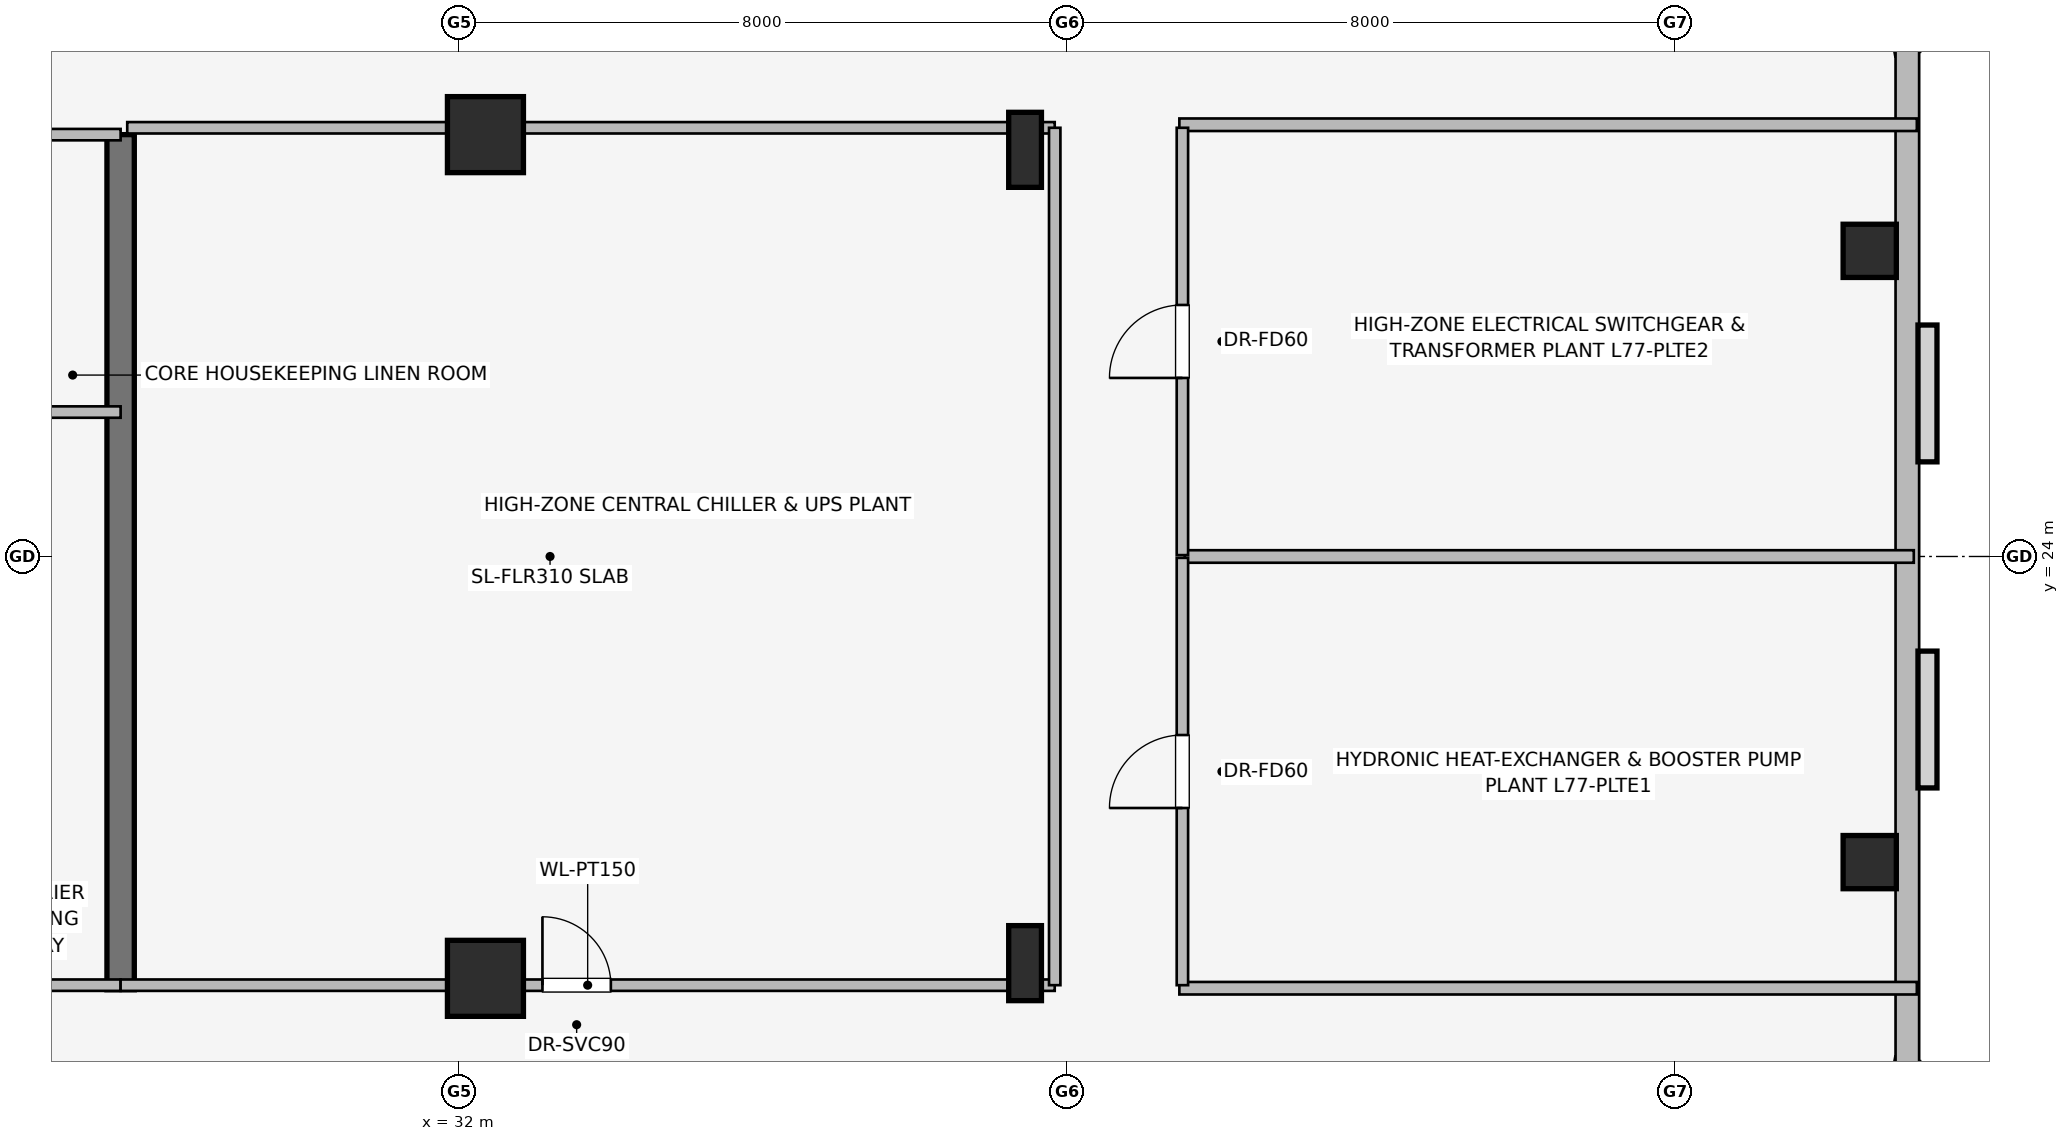
"""IFC4 building model, lengths in metres.
Left out: names, types, materials, properties, quantities, classifications, styles, units other than length and angle.
Written with IfcOpenShell. Run it as: python <this file> out.ifc"""

import sys

from ifc_helpers import new_model, si_unit, direction, frame, frame_2d, origin, origin_2d, place, context, subcontext, project, spatial, rectangle, i_section, extrude, element, fill, save


model = new_model("IFC4")
c1 = context("Model", 3, precision=1e-05, world=origin(), true_north=direction((0.0, 1.0)))
c2 = subcontext(c1, "Body", "Model", "MODEL_VIEW")
j1 = project(units=[si_unit("LENGTHUNIT", "METRE"), si_unit("PLANEANGLEUNIT", "RADIAN")], contexts=[c1])
p1 = place(None, origin())
s1 = spatial("IfcSite", under=j1, at=p1, CompositionType="ELEMENT")
p2 = place(p1, origin())
s2 = spatial("IfcBuilding", under=s1, at=p2, CompositionType="ELEMENT")
p3 = place(p2, frame((0.0, 0.0, 285.1)))
s3 = spatial("IfcBuildingStorey", under=s2, at=p3, CompositionType="ELEMENT", Elevation=285.1)
p4 = place(p3, frame((27.55, 29.55, 0.0), z_axis=(0.0, 0.0, 1.0), x_axis=(0.0, -1.0, 0.0)))
e1 = element("IfcWall", 1, at=p4, inside=s3, PredefinedType="SHEAR", context=c2, shape_type="SweptSolid", body=[
    extrude(rectangle(XDim=11.25, YDim=0.36, at=frame_2d((5.625, 0.0))), origin(), (0.0, 0.0, 1.0), 6.2),
])
for number, where, z_axis, x_axis in (
    (2, (32.35, 18.45, 0.0), (0.0, 0.0, 1.0), (1.0, 0.0, 0.0)),
    (3, (32.35, 29.55, 0.0), (0.0, 0.0, 1.0), (1.0, 0.0, 0.0)),
):
    element("IfcColumn", number, at=place(p3, frame(where, z_axis=z_axis, x_axis=x_axis)), inside=s3, PredefinedType="COLUMN", context=c2, shape_type="SweptSolid", body=[
        extrude(rectangle(XDim=1.0, YDim=1.0, at=origin_2d()), origin(), (0.0, 0.0, 1.0), 6.2),
    ])
for number, where, z_axis, x_axis in (
    (4, (50.563, 19.979, 0.0), (0.0, 0.0, 1.0), (1.0, 0.0, 0.0)),
    (5, (50.563, 28.021, 0.0), (0.0, 0.0, 1.0), (1.0, 0.0, 0.0)),
):
    element("IfcColumn", number, at=place(p3, frame(where, z_axis=z_axis, x_axis=x_axis)), inside=s3, PredefinedType="COLUMN", context=c2, shape_type="SweptSolid", body=[
        extrude(rectangle(XDim=0.7, YDim=0.7, at=origin_2d()), origin(), (0.0, 0.0, 1.0), 6.2),
    ])
for number, where, z_axis, x_axis in (
    (6, (39.45, 18.65, 0.0), (0.0, 0.0, 1.0), (1.0, 0.0, 0.0)),
    (7, (39.45, 29.35, 0.0), (0.0, 0.0, 1.0), (1.0, 0.0, 0.0)),
):
    element("IfcColumn", number, at=place(p3, frame(where, z_axis=z_axis, x_axis=x_axis)), inside=s3, PredefinedType="COLUMN", context=c2, shape_type="SweptSolid", body=[
        extrude(i_section(OverallWidth=0.431, OverallDepth=0.987, WebThickness=0.034, FlangeThickness=0.062, at=origin_2d()), origin(), (0.0, 0.0, 1.0), 6.2),
    ])
for number, where, z_axis, x_axis in (
    (8, (50.759, 32.257, 0.0), (0.0, 0.0, 1.0), (0.181, -0.984, 0.0)),
    (9, (51.062, 17.392, 0.0), (0.0, 0.0, 1.0), (-0.181, -0.984, 0.0)),
):
    element("IfcWall", number, at=place(p3, frame(where, z_axis=z_axis, x_axis=x_axis)), inside=s3, PredefinedType="STANDARD", context=c2, shape_type="SweptSolid", body=[
        extrude(rectangle(XDim=1.677, YDim=0.33, at=frame_2d((0.838, 0.0))), origin(), (0.0, 0.0, 1.0), 5.88),
    ])
p5 = place(p3, frame((51.058, 30.702, 0.0), z_axis=(0.0, 0.0, 1.0), x_axis=(0.0, -1.0, 0.0)))
e10 = element("IfcWall", 10, at=p5, inside=s3, PredefinedType="STANDARD", context=c2, shape_type="SweptSolid", body=[
    extrude(rectangle(XDim=13.404, YDim=0.31, at=frame_2d((6.702, 0.0))), origin(), (0.0, 0.0, 1.0), 5.88),
])
for number, where, z_axis, x_axis in (
    (11, (25.32, 25.9, 0.0), (0.0, 0.0, 1.0), (1.0, 0.0, 0.0)),
    (12, (25.32, 18.36, 0.0), (0.0, 0.0, 1.0), (1.0, 0.0, 0.0)),
):
    element("IfcWall", number, at=place(p3, frame(where, z_axis=z_axis, x_axis=x_axis)), inside=s3, PredefinedType="PARTITIONING", context=c2, shape_type="SweptSolid", body=[
        extrude(rectangle(XDim=2.23, YDim=0.15, at=frame_2d((1.115, 0.0))), origin(), (0.0, 0.0, 1.0), 5.88),
    ])
p6 = place(p3, frame((27.55, 29.55, 0.0), z_axis=(0.0, 0.0, 1.0), x_axis=(-1.0, 0.0, 0.0)))
e13 = element("IfcWall", 13, at=p6, inside=s3, PredefinedType="PARTITIONING", context=c2, shape_type="SweptSolid", body=[
    extrude(rectangle(XDim=2.23, YDim=0.15, at=frame_2d((1.115, 0.0))), origin(), (0.0, 0.0, 1.0), 4.78),
])
p7 = place(p3, frame((27.55, 18.36, 0.0), z_axis=(0.0, 0.0, 1.0), x_axis=(1.0, 0.0, 0.0)))
e14 = element("IfcWall", 14, at=p7, inside=s3, PredefinedType="PARTITIONING", context=c2, shape_type="SweptSolid", body=[
    extrude(rectangle(XDim=12.29, YDim=0.15, at=frame_2d((6.145, 0.0))), origin(), (0.0, 0.0, 1.0), 5.021),
])
p8 = place(p7, frame((5.55, 0.0, 0.0)))
e15 = element("IfcOpeningElement", 15, at=p8, cuts=e14, PredefinedType="OPENING", context=c2, shape_type="SweptSolid", body=[
    extrude(rectangle(XDim=0.9, YDim=2.0, at=frame_2d((0.45, 1.0))), frame((0.0, 0.085, 0.0), z_axis=(0.0, -1.0, 0.0), x_axis=(1.0, 0.0, 0.0)), (0.0, 0.0, 1.0), 0.17),
])
p9 = place(p3, frame((39.84, 29.64, 0.0), z_axis=(0.0, 0.0, 1.0), x_axis=(-1.0, 0.0, 0.0)))
e16 = element("IfcWall", 16, at=p9, inside=s3, PredefinedType="PARTITIONING", context=c2, shape_type="SweptSolid", body=[
    extrude(rectangle(XDim=12.203, YDim=0.15, at=frame_2d((6.102, 0.0))), origin(), (0.0, 0.0, 1.0), 5.021),
])
p10 = place(p3, frame((39.84, 18.36, 0.0), z_axis=(0.0, 0.0, 1.0), x_axis=(0.0, 1.0, 0.0)))
e17 = element("IfcWall", 17, at=p10, inside=s3, PredefinedType="PARTITIONING", context=c2, shape_type="SweptSolid", body=[
    extrude(rectangle(XDim=11.28, YDim=0.15, at=frame_2d((5.64, 0.0))), origin(), (0.0, 0.0, 1.0), 5.88),
])
for number, where, z_axis, x_axis in (
    (18, (41.48, 18.32, 0.0), (0.0, 0.0, 1.0), (1.0, 0.0, 0.0)),
    (19, (41.48, 29.68, 0.0), (0.0, 0.0, 1.0), (1.0, 0.0, 0.0)),
):
    element("IfcWall", number, at=place(p3, frame(where, z_axis=z_axis, x_axis=x_axis)), inside=s3, PredefinedType="PARTITIONING", context=c2, shape_type="SweptSolid", body=[
        extrude(rectangle(XDim=9.703, YDim=0.165, at=frame_2d((4.852, 0.0))), origin(), (0.0, 0.0, 1.0), 5.88),
    ])
p11 = place(p3, frame((41.55, 24.0, 0.0), z_axis=(0.0, 0.0, 1.0), x_axis=(1.0, 0.0, 0.0)))
e20 = element("IfcWall", 20, at=p11, inside=s3, PredefinedType="PARTITIONING", context=c2, shape_type="SweptSolid", body=[
    extrude(rectangle(XDim=9.593, YDim=0.165, at=frame_2d((4.796, 0.0))), origin(), (0.0, 0.0, 1.0), 5.88),
])
p12 = place(p3, frame((41.52, 18.36, 0.0), z_axis=(0.0, 0.0, 1.0), x_axis=(0.0, 1.0, 0.0)))
e21 = element("IfcWall", 21, at=p12, inside=s3, PredefinedType="PARTITIONING", context=c2, shape_type="SweptSolid", body=[
    extrude(rectangle(XDim=5.622, YDim=0.15, at=frame_2d((2.811, 0.0))), origin(), (0.0, 0.0, 1.0), 5.88),
])
p13 = place(p12, frame((2.331, 0.0, 0.0)))
e22 = element("IfcOpeningElement", 22, at=p13, cuts=e21, PredefinedType="OPENING", context=c2, shape_type="SweptSolid", body=[
    extrude(rectangle(XDim=0.96, YDim=2.0, at=frame_2d((0.48, 1.0))), frame((0.0, 0.085, 0.0), z_axis=(0.0, -1.0, 0.0), x_axis=(1.0, 0.0, 0.0)), (0.0, 0.0, 1.0), 0.17),
])
p14 = place(p3, frame((41.52, 24.018, 0.0), z_axis=(0.0, 0.0, 1.0), x_axis=(0.0, 1.0, 0.0)))
e23 = element("IfcWall", 23, at=p14, inside=s3, PredefinedType="PARTITIONING", context=c2, shape_type="SweptSolid", body=[
    extrude(rectangle(XDim=5.622, YDim=0.15, at=frame_2d((2.811, 0.0))), origin(), (0.0, 0.0, 1.0), 5.88),
])
p15 = place(p14, frame((2.331, 0.0, 0.0)))
e24 = element("IfcOpeningElement", 24, at=p15, cuts=e23, PredefinedType="OPENING", context=c2, shape_type="SweptSolid", body=[
    extrude(rectangle(XDim=0.96, YDim=2.0, at=frame_2d((0.48, 1.0))), frame((0.0, 0.085, 0.0), z_axis=(0.0, -1.0, 0.0), x_axis=(1.0, 0.0, 0.0)), (0.0, 0.0, 1.0), 0.17),
])
p16 = place(p8, origin())
e25 = element("IfcDoor", 25, at=p16, inside=s3, OperationType="SINGLE_SWING_LEFT", PredefinedType="DOOR", context=c2, shape_type="SweptSolid", body=[
    extrude(rectangle(XDim=0.9, YDim=2.0, at=frame_2d((0.45, 1.0))), frame((0.0, 0.025, 0.0), z_axis=(0.0, -1.0, 0.0), x_axis=(1.0, 0.0, 0.0)), (0.0, 0.0, 1.0), 0.05),
])
fill(e15, e25)
p17 = place(p13, origin())
e26 = element("IfcDoor", 26, at=p17, inside=s3, OperationType="SINGLE_SWING_LEFT", PredefinedType="DOOR", context=c2, shape_type="SweptSolid", body=[
    extrude(rectangle(XDim=0.96, YDim=2.0, at=frame_2d((0.48, 1.0))), frame((0.0, 0.025, 0.0), z_axis=(0.0, -1.0, 0.0), x_axis=(1.0, 0.0, 0.0)), (0.0, 0.0, 1.0), 0.05),
])
fill(e22, e26)
p18 = place(p15, origin())
e27 = element("IfcDoor", 27, at=p18, inside=s3, OperationType="SINGLE_SWING_LEFT", PredefinedType="DOOR", context=c2, shape_type="SweptSolid", body=[
    extrude(rectangle(XDim=0.96, YDim=2.0, at=frame_2d((0.48, 1.0))), frame((0.0, 0.025, 0.0), z_axis=(0.0, -1.0, 0.0), x_axis=(1.0, 0.0, 0.0)), (0.0, 0.0, 1.0), 0.05),
])
fill(e24, e27)
save(model, sys.argv[1])
